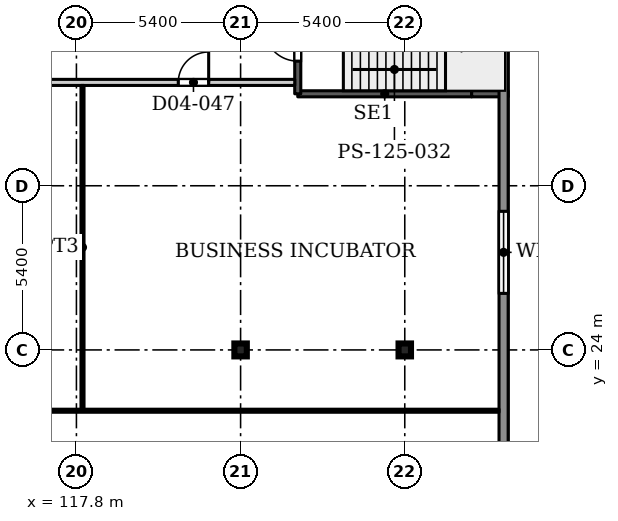
"""IFC4 building model, lengths in metres.
Left out: names, types, materials, properties, quantities, classifications, styles, units other than length and angle.
Written with IfcOpenShell. Run it as: python <this file> out.ifc"""

import sys

from ifc_helpers import new_model, si_unit, direction, frame, frame_2d, origin, origin_2d, place, context, subcontext, project, spatial, rectangle, i_section, extrude, source, transform, mapped, element, fill, save


model = new_model("IFC4")
c1 = context("Model", 3, precision=1e-05, world=origin(), true_north=direction((0.0, 1.0)))
c2 = subcontext(c1, "Body", "Model", "MODEL_VIEW")
j1 = project(units=[si_unit("LENGTHUNIT", "METRE"), si_unit("PLANEANGLEUNIT", "RADIAN")], contexts=[c1])
p1 = place(None, origin())
s1 = spatial("IfcSite", under=j1, at=p1, CompositionType="ELEMENT")
p2 = place(p1, origin())
s2 = spatial("IfcBuilding", under=s1, at=p2, CompositionType="ELEMENT")
p3 = place(p2, frame((0.0, 0.0, 21.5)))
s3 = spatial("IfcBuildingStorey", under=s2, at=p3, CompositionType="ELEMENT", Elevation=21.5)
for number, where, z_axis, x_axis in (
    (1, (123.2, 24.0, 0.0), (0.0, 0.0, 1.0), (1.0, 0.0, 0.0)),
    (2, (128.6, 24.0, 0.0), (0.0, 0.0, 1.0), (1.0, 0.0, 0.0)),
):
    element("IfcColumn", number, at=place(p3, frame(where, z_axis=z_axis, x_axis=x_axis)), inside=s3, PredefinedType="COLUMN", context=c2, shape_type="SweptSolid", body=[
        extrude(i_section(OverallWidth=0.409, OverallDepth=0.425, WebThickness=0.033, FlangeThickness=0.052, FilletRadius=0.013, at=origin_2d()), origin(), (0.0, 0.0, 1.0), 4.5),
    ])
p4 = place(p3, frame((131.85, 54.72, 0.0), z_axis=(0.0, 0.0, 1.0), x_axis=(0.0, -1.0, 0.0)))
e3 = element("IfcWall", 3, at=p4, inside=s3, PredefinedType="SOLIDWALL", context=c2, shape_type="SweptSolid", body=[
    extrude(rectangle(XDim=38.72, YDim=0.3, at=frame_2d((19.36, 0.0))), origin(), (0.0, 0.0, 1.0), 4.25),
])
p5 = place(p4, frame((2.435, 0.0, 0.9)))
e4 = element("IfcOpeningElement", 4, at=p5, cuts=e3, PredefinedType="OPENING", context=c2, shape_type="SweptSolid", body=[
    extrude(rectangle(XDim=2.7, YDim=2.1, at=frame_2d((1.35, 1.05))), frame((0.0, 0.16, 0.0), z_axis=(0.0, -1.0, 0.0), x_axis=(1.0, 0.0, 0.0)), (0.0, 0.0, 1.0), 0.32),
])
p6 = place(p4, frame((13.58, 0.0, 0.9)))
e5 = element("IfcOpeningElement", 5, at=p6, cuts=e3, PredefinedType="OPENING", context=c2, shape_type="SweptSolid", body=[
    extrude(rectangle(XDim=2.7, YDim=2.1, at=frame_2d((1.35, 1.05))), frame((0.0, 0.16, 0.0), z_axis=(0.0, -1.0, 0.0), x_axis=(1.0, 0.0, 0.0)), (0.0, 0.0, 1.0), 0.32),
])
p7 = place(p4, frame((26.16, 0.0, 0.9)))
e6 = element("IfcOpeningElement", 6, at=p7, cuts=e3, PredefinedType="OPENING", context=c2, shape_type="SweptSolid", body=[
    extrude(rectangle(XDim=2.7, YDim=2.1, at=frame_2d((1.35, 1.05))), frame((0.0, 0.16, 0.0), z_axis=(0.0, -1.0, 0.0), x_axis=(1.0, 0.0, 0.0)), (0.0, 0.0, 1.0), 0.32),
])
p8 = place(p3, frame((125.08, 32.425, 0.0), z_axis=(0.0, 0.0, 1.0), x_axis=(1.0, 0.0, 0.0)))
e7 = element("IfcWall", 7, at=p8, inside=s3, PredefinedType="SHEAR", context=c2, shape_type="SweptSolid", body=[
    extrude(rectangle(XDim=5.72, YDim=0.2, at=frame_2d((2.86, 0.0))), origin(), (0.0, 0.0, 1.0), 4.5),
])
p9 = place(p3, frame((130.8, 32.425, 0.0), z_axis=(0.0, 0.0, 1.0), x_axis=(1.0, 0.0, 0.0)))
e8 = element("IfcWall", 8, at=p9, inside=s3, PredefinedType="SHEAR", context=c2, shape_type="SweptSolid", body=[
    extrude(rectangle(XDim=1.2, YDim=0.2, at=frame_2d((0.6, 0.0))), origin(), (0.0, 0.0, 1.0), 4.5),
])
p10 = place(p3, frame((125.08, 32.425, 0.0), z_axis=(0.0, 0.0, 1.0), x_axis=(0.0, 1.0, 0.0)))
e9 = element("IfcWall", 9, at=p10, inside=s3, PredefinedType="SHEAR", context=c2, shape_type="SweptSolid", body=[
    extrude(rectangle(XDim=3.15, YDim=0.2, at=frame_2d((1.575, 0.0))), origin(), (0.0, 0.0, 1.0), 4.5),
])
p11 = place(p10, frame((1.075, 0.0, 0.0)))
e10 = element("IfcOpeningElement", 10, at=p11, cuts=e9, PredefinedType="OPENING", context=c2, shape_type="SweptSolid", body=[
    extrude(rectangle(XDim=1.1, YDim=2.2, at=frame_2d((0.55, 1.1))), frame((0.0, 0.11, 0.0), z_axis=(0.0, -1.0, 0.0), x_axis=(1.0, 0.0, 0.0)), (0.0, 0.0, 1.0), 0.22),
])
p12 = place(p3, frame((91.95, 22.0, 0.0), z_axis=(0.0, 0.0, 1.0), x_axis=(1.0, 0.0, 0.0)))
e11 = element("IfcWall", 11, at=p12, inside=s3, PredefinedType="PARTITIONING", context=c2, shape_type="SweptSolid", body=[
    extrude(rectangle(XDim=39.751, YDim=0.1, at=frame_2d((19.875, 0.0))), origin(), (0.0, 0.0, 1.0), 4.18),
])
p13 = place(p3, frame((92.1, 32.8, 0.0), z_axis=(0.0, 0.0, 1.0), x_axis=(1.0, 0.0, 0.0)))
e12 = element("IfcWall", 12, at=p13, inside=s3, PredefinedType="PARTITIONING", context=c2, shape_type="SweptSolid", body=[
    extrude(rectangle(XDim=32.881, YDim=0.2, at=frame_2d((16.44, 0.0))), origin(), (0.0, 0.0, 1.0), 4.18),
])
p14 = place(p13, frame((6.3, 0.0, 0.0)))
e13 = element("IfcOpeningElement", 13, at=p14, cuts=e12, PredefinedType="OPENING", context=c2, shape_type="SweptSolid", body=[
    extrude(rectangle(XDim=1.0, YDim=2.1, at=frame_2d((0.5, 1.05))), frame((0.0, 0.11, 0.0), z_axis=(0.0, -1.0, 0.0), x_axis=(1.0, 0.0, 0.0)), (0.0, 0.0, 1.0), 0.22),
])
p15 = place(p13, frame((19.3, 0.0, 0.0)))
e14 = element("IfcOpeningElement", 14, at=p15, cuts=e12, PredefinedType="OPENING", context=c2, shape_type="SweptSolid", body=[
    extrude(rectangle(XDim=1.0, YDim=2.1, at=frame_2d((0.5, 1.05))), frame((0.0, 0.11, 0.0), z_axis=(0.0, -1.0, 0.0), x_axis=(1.0, 0.0, 0.0)), (0.0, 0.0, 1.0), 0.22),
])
p16 = place(p13, frame((29.05, 0.0, 0.0)))
e15 = element("IfcOpeningElement", 15, at=p16, cuts=e12, PredefinedType="OPENING", context=c2, shape_type="SweptSolid", body=[
    extrude(rectangle(XDim=1.0, YDim=2.1, at=frame_2d((0.5, 1.05))), frame((0.0, 0.11, 0.0), z_axis=(0.0, -1.0, 0.0), x_axis=(1.0, 0.0, 0.0)), (0.0, 0.0, 1.0), 0.22),
])
p17 = place(p3, frame((118.0, 22.05, 0.0), z_axis=(0.0, 0.0, 1.0), x_axis=(0.0, 1.0, 0.0)))
e16 = element("IfcWall", 16, at=p17, inside=s3, PredefinedType="PARTITIONING", context=c2, shape_type="SweptSolid", body=[
    extrude(rectangle(XDim=10.65, YDim=0.1, at=frame_2d((5.325, 0.0))), origin(), (0.0, 0.0, 1.0), 4.18),
])
m1 = source(origin(), c2, "Body", "SweptSolid", [
    extrude(rectangle(XDim=2.7, YDim=2.1, at=frame_2d((1.35, 1.05))), frame((0.0, 0.03, 0.0), z_axis=(0.0, -1.0, 0.0), x_axis=(1.0, 0.0, 0.0)), (0.0, 0.0, 1.0), 0.06),
])
p18 = place(p7, origin())
e17 = element("IfcWindow", 17, at=p18, inside=s3, PartitioningType="SINGLE_PANEL", PredefinedType="WINDOW", context=c2, shape_type="MappedRepresentation", body=[
    mapped(m1, transform((0.0, 0.0, 0.0), x_axis=(1.0, 0.0, 0.0), y_axis=(0.0, 1.0, 0.0), z_axis=(0.0, 0.0, 1.0), scale=1.0)),
])
fill(e6, e17)
m2 = source(origin(), c2, "Body", "SweptSolid", [
    extrude(rectangle(XDim=1.1, YDim=2.2, at=frame_2d((0.55, 1.1))), frame((0.0, 0.025, 0.0), z_axis=(0.0, -1.0, 0.0), x_axis=(1.0, 0.0, 0.0)), (0.0, 0.0, 1.0), 0.05),
])
p19 = place(p11, origin())
e18 = element("IfcDoor", 18, at=p19, inside=s3, OperationType="SINGLE_SWING_LEFT", PredefinedType="DOOR", context=c2, shape_type="MappedRepresentation", body=[
    mapped(m2, transform((0.0, 0.0, 0.0), x_axis=(1.0, 0.0, 0.0), y_axis=(0.0, 1.0, 0.0), z_axis=(0.0, 0.0, 1.0), scale=1.0)),
])
fill(e10, e18)
m3 = source(origin(), c2, "Body", "SweptSolid", [
    extrude(rectangle(XDim=1.0, YDim=2.1, at=frame_2d((0.5, 1.05))), frame((0.0, 0.025, 0.0), z_axis=(0.0, -1.0, 0.0), x_axis=(1.0, 0.0, 0.0)), (0.0, 0.0, 1.0), 0.05),
])
p20 = place(p16, origin())
e19 = element("IfcDoor", 19, at=p20, inside=s3, OperationType="SINGLE_SWING_LEFT", PredefinedType="DOOR", context=c2, shape_type="MappedRepresentation", body=[
    mapped(m3, transform((0.0, 0.0, 0.0), x_axis=(1.0, 0.0, 0.0), y_axis=(0.0, 1.0, 0.0), z_axis=(0.0, 0.0, 1.0), scale=1.0)),
])
fill(e15, e19)
save(model, sys.argv[1])
